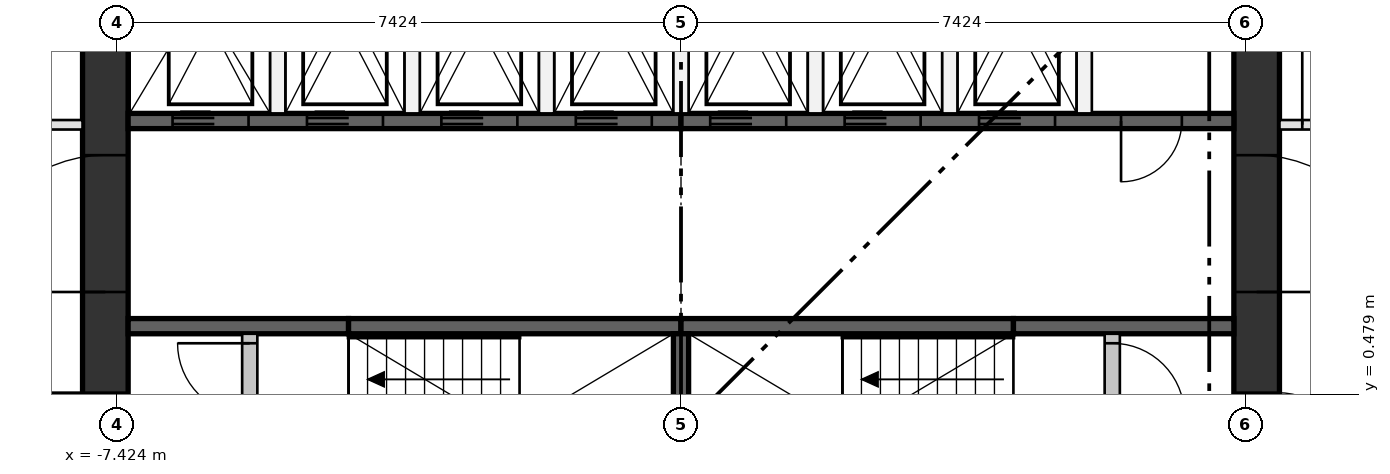
"""IFC4 building model, lengths in metres.
Left out: names, types, materials, properties, quantities, classifications, styles, units other than length and angle.
Written with IfcOpenShell. Run it as: python <this file> out.ifc"""

import sys

from ifc_helpers import new_model, si_unit, direction, frame, frame_2d, origin, place, context, subcontext, project, spatial, rectangle, extrude, element, fill, save


model = new_model("IFC4")
c1 = context("Model", 3, precision=1e-05, world=origin(), true_north=direction((0.0, 1.0)))
c2 = subcontext(c1, "Body", "Model", "MODEL_VIEW")
j1 = project(units=[si_unit("LENGTHUNIT", "METRE"), si_unit("PLANEANGLEUNIT", "RADIAN")], contexts=[c1])
p1 = place(None, origin())
s1 = spatial("IfcSite", under=j1, at=p1, CompositionType="ELEMENT")
p2 = place(p1, origin())
s2 = spatial("IfcBuilding", under=s1, at=p2, CompositionType="ELEMENT")
p3 = place(p2, frame((0.0, 0.0, 141.05)))
s3 = spatial("IfcBuildingStorey", under=s2, at=p3, CompositionType="ELEMENT", Elevation=141.05)
p4 = place(p3, frame((-7.574, -7.274, 0.0), z_axis=(0.0, 0.0, 1.0), x_axis=(0.0, 1.0, 0.0)))
e1 = element("IfcWall", 1, at=p4, inside=s3, PredefinedType="SHEAR", context=c2, shape_type="SweptSolid", body=[
    extrude(rectangle(XDim=14.548, YDim=0.6, at=frame_2d((7.274, 0.0))), origin(), (0.0, 0.0, 1.0), 3.35),
])
p5 = place(p4, frame((6.774, 0.0, 0.0)))
e2 = element("IfcOpeningElement", 2, at=p5, cuts=e1, PredefinedType="OPENING", context=c2, shape_type="SweptSolid", body=[
    extrude(rectangle(XDim=1.0, YDim=2.1, at=frame_2d((0.5, 1.05))), frame((0.0, 0.31, 0.0), z_axis=(0.0, -1.0, 0.0), x_axis=(1.0, 0.0, 0.0)), (0.0, 0.0, 1.0), 0.62),
])
p6 = place(p4, frame((3.649, 0.0, 0.0)))
e3 = element("IfcOpeningElement", 3, at=p6, cuts=e1, PredefinedType="OPENING", context=c2, shape_type="SweptSolid", body=[
    extrude(rectangle(XDim=1.8, YDim=2.1, at=frame_2d((0.9, 1.05))), frame((0.0, 0.31, 0.0), z_axis=(0.0, -1.0, 0.0), x_axis=(1.0, 0.0, 0.0)), (0.0, 0.0, 1.0), 0.62),
])
p7 = place(p4, frame((9.098, 0.0, 0.0)))
e4 = element("IfcOpeningElement", 4, at=p7, cuts=e1, PredefinedType="OPENING", context=c2, shape_type="SweptSolid", body=[
    extrude(rectangle(XDim=1.8, YDim=2.1, at=frame_2d((0.9, 1.05))), frame((0.0, 0.31, 0.0), z_axis=(0.0, -1.0, 0.0), x_axis=(1.0, 0.0, 0.0)), (0.0, 0.0, 1.0), 0.62),
])
p8 = place(p3, frame((7.574, -7.274, 0.0), z_axis=(0.0, 0.0, 1.0), x_axis=(0.0, 1.0, 0.0)))
e5 = element("IfcWall", 5, at=p8, inside=s3, PredefinedType="SHEAR", context=c2, shape_type="SweptSolid", body=[
    extrude(rectangle(XDim=14.548, YDim=0.6, at=frame_2d((7.274, 0.0))), origin(), (0.0, 0.0, 1.0), 3.35),
])
p9 = place(p8, frame((6.774, 0.0, 0.0)))
e6 = element("IfcOpeningElement", 6, at=p9, cuts=e5, PredefinedType="OPENING", context=c2, shape_type="SweptSolid", body=[
    extrude(rectangle(XDim=1.0, YDim=2.1, at=frame_2d((0.5, 1.05))), frame((0.0, 0.31, 0.0), z_axis=(0.0, -1.0, 0.0), x_axis=(1.0, 0.0, 0.0)), (0.0, 0.0, 1.0), 0.62),
])
p10 = place(p8, frame((3.649, 0.0, 0.0)))
e7 = element("IfcOpeningElement", 7, at=p10, cuts=e5, PredefinedType="OPENING", context=c2, shape_type="SweptSolid", body=[
    extrude(rectangle(XDim=1.8, YDim=2.1, at=frame_2d((0.9, 1.05))), frame((0.0, 0.31, 0.0), z_axis=(0.0, -1.0, 0.0), x_axis=(1.0, 0.0, 0.0)), (0.0, 0.0, 1.0), 0.62),
])
p11 = place(p8, frame((9.098, 0.0, 0.0)))
e8 = element("IfcOpeningElement", 8, at=p11, cuts=e5, PredefinedType="OPENING", context=c2, shape_type="SweptSolid", body=[
    extrude(rectangle(XDim=1.8, YDim=2.1, at=frame_2d((0.9, 1.05))), frame((0.0, 0.31, 0.0), z_axis=(0.0, -1.0, 0.0), x_axis=(1.0, 0.0, 0.0)), (0.0, 0.0, 1.0), 0.62),
])
p12 = place(p3, frame((-7.274, 4.074, 0.0), z_axis=(0.0, 0.0, 1.0), x_axis=(1.0, 0.0, 0.0)))
e9 = element("IfcWall", 9, at=p12, inside=s3, PredefinedType="SHEAR", context=c2, shape_type="SweptSolid", body=[
    extrude(rectangle(XDim=7.274, YDim=0.2, at=frame_2d((3.637, 0.0))), origin(), (0.0, 0.0, 1.0), 3.0),
])
p13 = place(p12, frame((0.584, 0.0, 0.0)))
e10 = element("IfcOpeningElement", 10, at=p13, cuts=e9, PredefinedType="OPENING", context=c2, shape_type="SweptSolid", body=[
    extrude(rectangle(XDim=1.0, YDim=2.1, at=frame_2d((0.5, 1.05))), frame((0.0, 0.11, 0.0), z_axis=(0.0, -1.0, 0.0), x_axis=(1.0, 0.0, 0.0)), (0.0, 0.0, 1.0), 0.22),
])
p14 = place(p12, frame((2.353, 0.0, 0.0)))
e11 = element("IfcOpeningElement", 11, at=p14, cuts=e9, PredefinedType="OPENING", context=c2, shape_type="SweptSolid", body=[
    extrude(rectangle(XDim=1.0, YDim=2.1, at=frame_2d((0.5, 1.05))), frame((0.0, 0.11, 0.0), z_axis=(0.0, -1.0, 0.0), x_axis=(1.0, 0.0, 0.0)), (0.0, 0.0, 1.0), 0.22),
])
p15 = place(p12, frame((4.121, 0.0, 0.0)))
e12 = element("IfcOpeningElement", 12, at=p15, cuts=e9, PredefinedType="OPENING", context=c2, shape_type="SweptSolid", body=[
    extrude(rectangle(XDim=1.0, YDim=2.1, at=frame_2d((0.5, 1.05))), frame((0.0, 0.11, 0.0), z_axis=(0.0, -1.0, 0.0), x_axis=(1.0, 0.0, 0.0)), (0.0, 0.0, 1.0), 0.22),
])
p16 = place(p12, frame((5.89, 0.0, 0.0)))
e13 = element("IfcOpeningElement", 13, at=p16, cuts=e9, PredefinedType="OPENING", context=c2, shape_type="SweptSolid", body=[
    extrude(rectangle(XDim=1.0, YDim=2.1, at=frame_2d((0.5, 1.05))), frame((0.0, 0.11, 0.0), z_axis=(0.0, -1.0, 0.0), x_axis=(1.0, 0.0, 0.0)), (0.0, 0.0, 1.0), 0.22),
])
p17 = place(p3, frame((0.0, 4.074, 0.0), z_axis=(0.0, 0.0, 1.0), x_axis=(1.0, 0.0, 0.0)))
e14 = element("IfcWall", 14, at=p17, inside=s3, PredefinedType="SHEAR", context=c2, shape_type="SweptSolid", body=[
    extrude(rectangle(XDim=7.274, YDim=0.2, at=frame_2d((3.637, 0.0))), origin(), (0.0, 0.0, 1.0), 3.0),
])
p18 = place(p17, frame((0.384, 0.0, 0.0)))
e15 = element("IfcOpeningElement", 15, at=p18, cuts=e14, PredefinedType="OPENING", context=c2, shape_type="SweptSolid", body=[
    extrude(rectangle(XDim=1.0, YDim=2.1, at=frame_2d((0.5, 1.05))), frame((0.0, 0.11, 0.0), z_axis=(0.0, -1.0, 0.0), x_axis=(1.0, 0.0, 0.0)), (0.0, 0.0, 1.0), 0.22),
])
p19 = place(p17, frame((2.153, 0.0, 0.0)))
e16 = element("IfcOpeningElement", 16, at=p19, cuts=e14, PredefinedType="OPENING", context=c2, shape_type="SweptSolid", body=[
    extrude(rectangle(XDim=1.0, YDim=2.1, at=frame_2d((0.5, 1.05))), frame((0.0, 0.11, 0.0), z_axis=(0.0, -1.0, 0.0), x_axis=(1.0, 0.0, 0.0)), (0.0, 0.0, 1.0), 0.22),
])
p20 = place(p17, frame((3.921, 0.0, 0.0)))
e17 = element("IfcOpeningElement", 17, at=p20, cuts=e14, PredefinedType="OPENING", context=c2, shape_type="SweptSolid", body=[
    extrude(rectangle(XDim=1.0, YDim=2.1, at=frame_2d((0.5, 1.05))), frame((0.0, 0.11, 0.0), z_axis=(0.0, -1.0, 0.0), x_axis=(1.0, 0.0, 0.0)), (0.0, 0.0, 1.0), 0.22),
])
p21 = place(p17, frame((5.79, 0.0, 0.0)))
e18 = element("IfcOpeningElement", 18, at=p21, cuts=e14, PredefinedType="OPENING", context=c2, shape_type="SweptSolid", body=[
    extrude(rectangle(XDim=0.8, YDim=2.1, at=frame_2d((0.4, 1.05))), frame((0.0, 0.11, 0.0), z_axis=(0.0, -1.0, 0.0), x_axis=(1.0, 0.0, 0.0)), (0.0, 0.0, 1.0), 0.22),
])
p22 = place(p3, frame((-7.274, 1.375, 0.0), z_axis=(0.0, 0.0, 1.0), x_axis=(1.0, 0.0, 0.0)))
e19 = element("IfcWall", 19, at=p22, inside=s3, PredefinedType="SHEAR", context=c2, shape_type="SweptSolid", body=[
    extrude(rectangle(XDim=2.9, YDim=0.2, at=frame_2d((1.45, 0.0))), origin(), (0.0, 0.0, 1.0), 3.0),
])
for number, where, z_axis, x_axis in (
    (20, (-4.374, 1.375, 0.0), (0.0, 0.0, 1.0), (1.0, 0.0, 0.0)),
    (21, (0.0, 1.375, 0.0), (0.0, 0.0, 1.0), (1.0, 0.0, 0.0)),
):
    element("IfcWall", number, at=place(p3, frame(where, z_axis=z_axis, x_axis=x_axis)), inside=s3, PredefinedType="SHEAR", context=c2, shape_type="SweptSolid", body=[
        extrude(rectangle(XDim=4.374, YDim=0.2, at=frame_2d((2.187, 0.0))), origin(), (0.0, 0.0, 1.0), 3.0),
    ])
p23 = place(p3, frame((4.374, 1.375, 0.0), z_axis=(0.0, 0.0, 1.0), x_axis=(1.0, 0.0, 0.0)))
e22 = element("IfcWall", 22, at=p23, inside=s3, PredefinedType="SHEAR", context=c2, shape_type="SweptSolid", body=[
    extrude(rectangle(XDim=2.9, YDim=0.2, at=frame_2d((1.45, 0.0))), origin(), (0.0, 0.0, 1.0), 3.0),
])
p24 = place(p3, frame((0.0, -1.275, 0.0), z_axis=(0.0, 0.0, 1.0), x_axis=(0.0, 1.0, 0.0)))
e23 = element("IfcWall", 23, at=p24, inside=s3, PredefinedType="SHEAR", context=c2, shape_type="SweptSolid", body=[
    extrude(rectangle(XDim=2.55, YDim=0.2, at=frame_2d((1.275, 0.0))), origin(), (0.0, 0.0, 1.0), 3.0),
])
for number, where, z_axis, x_axis in (
    (24, (-5.305, 4.174, 0.0), (0.0, 0.0, 1.0), (0.0, 1.0, 0.0)),
    (25, (-3.537, 4.174, 0.0), (0.0, 0.0, 1.0), (0.0, 1.0, 0.0)),
    (26, (-1.769, 4.174, 0.0), (0.0, 0.0, 1.0), (0.0, 1.0, 0.0)),
    (27, (0.0, 4.174, 0.0), (0.0, 0.0, 1.0), (0.0, 1.0, 0.0)),
    (28, (1.769, 4.174, 0.0), (0.0, 0.0, 1.0), (0.0, 1.0, 0.0)),
    (29, (3.537, 4.174, 0.0), (0.0, 0.0, 1.0), (0.0, 1.0, 0.0)),
    (30, (5.305, 4.174, 0.0), (0.0, 0.0, 1.0), (0.0, 1.0, 0.0)),
):
    element("IfcWall", number, at=place(p3, frame(where, z_axis=z_axis, x_axis=x_axis)), inside=s3, PredefinedType="PARTITIONING", context=c2, shape_type="SweptSolid", body=[
        extrude(rectangle(XDim=3.1, YDim=0.2, at=frame_2d((1.55, 0.0))), origin(), (0.0, 0.0, 1.0), 3.0),
    ])
p25 = place(p3, frame((-5.674, -1.275, 0.0), z_axis=(0.0, 0.0, 1.0), x_axis=(0.0, 1.0, 0.0)))
e31 = element("IfcWall", 31, at=p25, inside=s3, PredefinedType="PARTITIONING", context=c2, shape_type="SweptSolid", body=[
    extrude(rectangle(XDim=2.55, YDim=0.2, at=frame_2d((1.275, 0.0))), origin(), (0.0, 0.0, 1.0), 3.0),
])
p26 = place(p25, frame((0.125, 0.0, 0.0)))
e32 = element("IfcOpeningElement", 32, at=p26, cuts=e31, PredefinedType="OPENING", context=c2, shape_type="SweptSolid", body=[
    extrude(rectangle(XDim=0.95, YDim=2.1, at=frame_2d((0.475, 1.05))), frame((0.0, 0.11, 0.0), z_axis=(0.0, -1.0, 0.0), x_axis=(1.0, 0.0, 0.0)), (0.0, 0.0, 1.0), 0.22),
])
p27 = place(p25, frame((1.475, 0.0, 0.0)))
e33 = element("IfcOpeningElement", 33, at=p27, cuts=e31, PredefinedType="OPENING", context=c2, shape_type="SweptSolid", body=[
    extrude(rectangle(XDim=0.95, YDim=2.1, at=frame_2d((0.475, 1.05))), frame((0.0, 0.11, 0.0), z_axis=(0.0, -1.0, 0.0), x_axis=(1.0, 0.0, 0.0)), (0.0, 0.0, 1.0), 0.22),
])
p28 = place(p3, frame((5.674, -1.275, 0.0), z_axis=(0.0, 0.0, 1.0), x_axis=(0.0, 1.0, 0.0)))
e34 = element("IfcWall", 34, at=p28, inside=s3, PredefinedType="PARTITIONING", context=c2, shape_type="SweptSolid", body=[
    extrude(rectangle(XDim=2.55, YDim=0.2, at=frame_2d((1.275, 0.0))), origin(), (0.0, 0.0, 1.0), 3.0),
])
p29 = place(p28, frame((0.125, 0.0, 0.0)))
e35 = element("IfcOpeningElement", 35, at=p29, cuts=e34, PredefinedType="OPENING", context=c2, shape_type="SweptSolid", body=[
    extrude(rectangle(XDim=0.95, YDim=2.1, at=frame_2d((0.475, 1.05))), frame((0.0, 0.11, 0.0), z_axis=(0.0, -1.0, 0.0), x_axis=(1.0, 0.0, 0.0)), (0.0, 0.0, 1.0), 0.22),
])
p30 = place(p28, frame((1.475, 0.0, 0.0)))
e36 = element("IfcOpeningElement", 36, at=p30, cuts=e34, PredefinedType="OPENING", context=c2, shape_type="SweptSolid", body=[
    extrude(rectangle(XDim=0.95, YDim=2.1, at=frame_2d((0.475, 1.05))), frame((0.0, 0.11, 0.0), z_axis=(0.0, -1.0, 0.0), x_axis=(1.0, 0.0, 0.0)), (0.0, 0.0, 1.0), 0.22),
])
p31 = place(p3, frame((7.874, 4.024, 0.0), z_axis=(0.0, 0.0, 1.0), x_axis=(1.0, 0.0, 0.0)))
e37 = element("IfcWall", 37, at=p31, inside=s3, PredefinedType="PARTITIONING", context=c2, shape_type="SweptSolid", body=[
    extrude(rectangle(XDim=3.529, YDim=0.125, at=frame_2d((1.764, 0.0))), origin(), (0.0, 0.0, 1.0), 3.0),
])
p32 = place(p31, frame((0.3, 0.0, 0.0)))
e38 = element("IfcOpeningElement", 38, at=p32, cuts=e37, PredefinedType="OPENING", context=c2, shape_type="SweptSolid", body=[
    extrude(rectangle(XDim=1.8, YDim=2.1, at=frame_2d((0.9, 1.05))), frame((0.0, 0.073, 0.0), z_axis=(0.0, -1.0, 0.0), x_axis=(1.0, 0.0, 0.0)), (0.0, 0.0, 1.0), 0.145),
])
p33 = place(p3, frame((-11.508, 4.024, 0.0), z_axis=(0.0, 0.0, 1.0), x_axis=(1.0, 0.0, 0.0)))
e39 = element("IfcWall", 39, at=p33, inside=s3, PredefinedType="PARTITIONING", context=c2, shape_type="SweptSolid", body=[
    extrude(rectangle(XDim=3.634, YDim=0.125, at=frame_2d((1.817, 0.0))), origin(), (0.0, 0.0, 1.0), 3.0),
])
p34 = place(p33, frame((1.3, 0.0, 0.0)))
e40 = element("IfcOpeningElement", 40, at=p34, cuts=e39, PredefinedType="OPENING", context=c2, shape_type="SweptSolid", body=[
    extrude(rectangle(XDim=1.0, YDim=2.1, at=frame_2d((0.5, 1.05))), frame((0.0, 0.073, 0.0), z_axis=(0.0, -1.0, 0.0), x_axis=(1.0, 0.0, 0.0)), (0.0, 0.0, 1.0), 0.145),
])
p35 = place(p13, frame((1.0, 0.0, 0.0), z_axis=(0.0, 0.0, 1.0), x_axis=(-1.0, 0.0, 0.0)))
e41 = element("IfcDoor", 41, at=p35, inside=s3, OperationType="DOUBLE_DOOR_SLIDING", PredefinedType="DOOR", context=c2, shape_type="SweptSolid", body=[
    extrude(rectangle(XDim=1.0, YDim=2.1, at=frame_2d((0.5, 1.05))), frame((0.0, 0.025, 0.0), z_axis=(0.0, -1.0, 0.0), x_axis=(1.0, 0.0, 0.0)), (0.0, 0.0, 1.0), 0.05),
])
fill(e10, e41)
p36 = place(p14, frame((1.0, 0.0, 0.0), z_axis=(0.0, 0.0, 1.0), x_axis=(-1.0, 0.0, 0.0)))
e42 = element("IfcDoor", 42, at=p36, inside=s3, OperationType="DOUBLE_DOOR_SLIDING", PredefinedType="DOOR", context=c2, shape_type="SweptSolid", body=[
    extrude(rectangle(XDim=1.0, YDim=2.1, at=frame_2d((0.5, 1.05))), frame((0.0, 0.025, 0.0), z_axis=(0.0, -1.0, 0.0), x_axis=(1.0, 0.0, 0.0)), (0.0, 0.0, 1.0), 0.05),
])
fill(e11, e42)
p37 = place(p15, frame((1.0, 0.0, 0.0), z_axis=(0.0, 0.0, 1.0), x_axis=(-1.0, 0.0, 0.0)))
e43 = element("IfcDoor", 43, at=p37, inside=s3, OperationType="DOUBLE_DOOR_SLIDING", PredefinedType="DOOR", context=c2, shape_type="SweptSolid", body=[
    extrude(rectangle(XDim=1.0, YDim=2.1, at=frame_2d((0.5, 1.05))), frame((0.0, 0.025, 0.0), z_axis=(0.0, -1.0, 0.0), x_axis=(1.0, 0.0, 0.0)), (0.0, 0.0, 1.0), 0.05),
])
fill(e12, e43)
p38 = place(p16, frame((1.0, 0.0, 0.0), z_axis=(0.0, 0.0, 1.0), x_axis=(-1.0, 0.0, 0.0)))
e44 = element("IfcDoor", 44, at=p38, inside=s3, OperationType="DOUBLE_DOOR_SLIDING", PredefinedType="DOOR", context=c2, shape_type="SweptSolid", body=[
    extrude(rectangle(XDim=1.0, YDim=2.1, at=frame_2d((0.5, 1.05))), frame((0.0, 0.025, 0.0), z_axis=(0.0, -1.0, 0.0), x_axis=(1.0, 0.0, 0.0)), (0.0, 0.0, 1.0), 0.05),
])
fill(e13, e44)
p39 = place(p18, frame((1.0, 0.0, 0.0), z_axis=(0.0, 0.0, 1.0), x_axis=(-1.0, 0.0, 0.0)))
e45 = element("IfcDoor", 45, at=p39, inside=s3, OperationType="DOUBLE_DOOR_SLIDING", PredefinedType="DOOR", context=c2, shape_type="SweptSolid", body=[
    extrude(rectangle(XDim=1.0, YDim=2.1, at=frame_2d((0.5, 1.05))), frame((0.0, 0.025, 0.0), z_axis=(0.0, -1.0, 0.0), x_axis=(1.0, 0.0, 0.0)), (0.0, 0.0, 1.0), 0.05),
])
fill(e15, e45)
p40 = place(p19, frame((1.0, 0.0, 0.0), z_axis=(0.0, 0.0, 1.0), x_axis=(-1.0, 0.0, 0.0)))
e46 = element("IfcDoor", 46, at=p40, inside=s3, OperationType="DOUBLE_DOOR_SLIDING", PredefinedType="DOOR", context=c2, shape_type="SweptSolid", body=[
    extrude(rectangle(XDim=1.0, YDim=2.1, at=frame_2d((0.5, 1.05))), frame((0.0, 0.025, 0.0), z_axis=(0.0, -1.0, 0.0), x_axis=(1.0, 0.0, 0.0)), (0.0, 0.0, 1.0), 0.05),
])
fill(e16, e46)
p41 = place(p20, frame((1.0, 0.0, 0.0), z_axis=(0.0, 0.0, 1.0), x_axis=(-1.0, 0.0, 0.0)))
e47 = element("IfcDoor", 47, at=p41, inside=s3, OperationType="DOUBLE_DOOR_SLIDING", PredefinedType="DOOR", context=c2, shape_type="SweptSolid", body=[
    extrude(rectangle(XDim=1.0, YDim=2.1, at=frame_2d((0.5, 1.05))), frame((0.0, 0.025, 0.0), z_axis=(0.0, -1.0, 0.0), x_axis=(1.0, 0.0, 0.0)), (0.0, 0.0, 1.0), 0.05),
])
fill(e17, e47)
p42 = place(p27, origin())
e48 = element("IfcDoor", 48, at=p42, inside=s3, OperationType="SINGLE_SWING_RIGHT", PredefinedType="DOOR", context=c2, shape_type="SweptSolid", body=[
    extrude(rectangle(XDim=0.95, YDim=2.1, at=frame_2d((0.475, 1.05))), frame((0.0, 0.025, 0.0), z_axis=(0.0, -1.0, 0.0), x_axis=(1.0, 0.0, 0.0)), (0.0, 0.0, 1.0), 0.05),
])
fill(e33, e48)
p43 = place(p30, frame((0.95, 0.0, 0.0), z_axis=(0.0, 0.0, 1.0), x_axis=(-1.0, 0.0, 0.0)))
e49 = element("IfcDoor", 49, at=p43, inside=s3, OperationType="SINGLE_SWING_LEFT", PredefinedType="DOOR", context=c2, shape_type="SweptSolid", body=[
    extrude(rectangle(XDim=0.95, YDim=2.1, at=frame_2d((0.475, 1.05))), frame((0.0, 0.025, 0.0), z_axis=(0.0, -1.0, 0.0), x_axis=(1.0, 0.0, 0.0)), (0.0, 0.0, 1.0), 0.05),
])
fill(e36, e49)
p44 = place(p21, frame((0.8, 0.0, 0.0), z_axis=(0.0, 0.0, 1.0), x_axis=(-1.0, 0.0, 0.0)))
e50 = element("IfcDoor", 50, at=p44, inside=s3, OperationType="SINGLE_SWING_LEFT", PredefinedType="DOOR", context=c2, shape_type="SweptSolid", body=[
    extrude(rectangle(XDim=0.8, YDim=2.1, at=frame_2d((0.4, 1.05))), frame((0.0, 0.025, 0.0), z_axis=(0.0, -1.0, 0.0), x_axis=(1.0, 0.0, 0.0)), (0.0, 0.0, 1.0), 0.05),
])
fill(e18, e50)
p45 = place(p5, origin())
e51 = element("IfcDoor", 51, at=p45, inside=s3, OperationType="SINGLE_SWING_RIGHT", PredefinedType="DOOR", context=c2, shape_type="SweptSolid", body=[
    extrude(rectangle(XDim=1.0, YDim=2.1, at=frame_2d((0.5, 1.05))), frame((0.0, 0.3, 0.0), z_axis=(0.0, -1.0, 0.0), x_axis=(1.0, 0.0, 0.0)), (0.0, 0.0, 1.0), 0.05),
])
fill(e2, e51)
p46 = place(p7, origin())
e52 = element("IfcDoor", 52, at=p46, inside=s3, OperationType="DOUBLE_DOOR_SINGLE_SWING", PredefinedType="DOOR", context=c2, shape_type="SweptSolid", body=[
    extrude(rectangle(XDim=1.8, YDim=2.1, at=frame_2d((0.9, 1.05))), frame((0.0, 0.025, 0.0), z_axis=(0.0, -1.0, 0.0), x_axis=(1.0, 0.0, 0.0)), (0.0, 0.0, 1.0), 0.05),
])
fill(e4, e52)
p47 = place(p9, frame((1.0, 0.0, 0.0), z_axis=(0.0, 0.0, 1.0), x_axis=(-1.0, 0.0, 0.0)))
e53 = element("IfcDoor", 53, at=p47, inside=s3, OperationType="SINGLE_SWING_LEFT", PredefinedType="DOOR", context=c2, shape_type="SweptSolid", body=[
    extrude(rectangle(XDim=1.0, YDim=2.1, at=frame_2d((0.5, 1.05))), frame((0.0, 0.3, 0.0), z_axis=(0.0, -1.0, 0.0), x_axis=(1.0, 0.0, 0.0)), (0.0, 0.0, 1.0), 0.05),
])
fill(e6, e53)
p48 = place(p11, frame((1.8, 0.0, 0.0), z_axis=(0.0, 0.0, 1.0), x_axis=(-1.0, 0.0, 0.0)))
e54 = element("IfcDoor", 54, at=p48, inside=s3, OperationType="DOUBLE_DOOR_SINGLE_SWING", PredefinedType="DOOR", context=c2, shape_type="SweptSolid", body=[
    extrude(rectangle(XDim=1.8, YDim=2.1, at=frame_2d((0.9, 1.05))), frame((0.0, 0.025, 0.0), z_axis=(0.0, -1.0, 0.0), x_axis=(1.0, 0.0, 0.0)), (0.0, 0.0, 1.0), 0.05),
])
fill(e8, e54)
p49 = place(p32, origin())
e55 = element("IfcDoor", 55, at=p49, inside=s3, OperationType="DOUBLE_DOOR_SINGLE_SWING", PredefinedType="DOOR", context=c2, shape_type="SweptSolid", body=[
    extrude(rectangle(XDim=1.8, YDim=2.1, at=frame_2d((0.9, 1.05))), frame((0.0, 0.025, 0.0), z_axis=(0.0, -1.0, 0.0), x_axis=(1.0, 0.0, 0.0)), (0.0, 0.0, 1.0), 0.05),
])
fill(e38, e55)
save(model, sys.argv[1])
